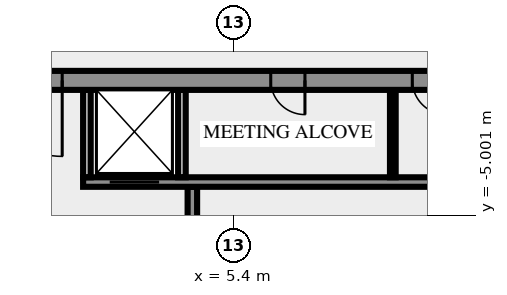
"""IFC4 building model, lengths in metres.
Left out: names, types, materials, properties, quantities, classifications, styles, units other than length and angle.
Written with IfcOpenShell. Run it as: python <this file> out.ifc"""

import sys

from ifc_helpers import new_model, si_unit, direction, frame, frame_2d, origin, place, context, subcontext, project, spatial, rectangle, extrude, element, fill, save


model = new_model("IFC4")
c1 = context("Model", 3, precision=1e-05, world=origin(), true_north=direction((0.0, 1.0)))
c2 = subcontext(c1, "Body", "Model", "MODEL_VIEW")
j1 = project(units=[si_unit("LENGTHUNIT", "METRE"), si_unit("PLANEANGLEUNIT", "RADIAN")], contexts=[c1])
p1 = place(None, origin())
s1 = spatial("IfcSite", under=j1, at=p1, CompositionType="ELEMENT")
p2 = place(p1, origin())
s2 = spatial("IfcBuilding", under=s1, at=p2, CompositionType="ELEMENT")
p3 = place(p2, frame((0.0, 0.0, 281.0)))
s3 = spatial("IfcBuildingStorey", under=s2, at=p3, CompositionType="ELEMENT", Elevation=281.0)
p4 = place(p3, frame((4.325, -7.25, 0.0), z_axis=(0.0, 0.0, 1.0), x_axis=(0.0, 1.0, 0.0)))
e1 = element("IfcWall", 1, at=p4, inside=s3, PredefinedType="SHEAR", context=c2, shape_type="SweptSolid", body=[
    extrude(rectangle(XDim=3.0, YDim=0.25, at=frame_2d((1.5, 0.0))), origin(), (0.0, 0.0, 1.0), 3.65),
])
p5 = place(p4, frame((0.8, 0.0, 0.0)))
e2 = element("IfcOpeningElement", 2, at=p5, cuts=e1, PredefinedType="OPENING", context=c2, shape_type="SweptSolid", body=[
    extrude(rectangle(XDim=1.4, YDim=2.1, at=frame_2d((0.7, 1.05))), frame((0.0, 0.135, 0.0), z_axis=(0.0, -1.0, 0.0), x_axis=(1.0, 0.0, 0.0)), (0.0, 0.0, 1.0), 0.27),
])
p6 = place(p3, frame((1.45, -4.125, 0.0), z_axis=(0.0, 0.0, 1.0), x_axis=(1.0, 0.0, 0.0)))
e3 = element("IfcWall", 3, at=p6, inside=s3, PredefinedType="SHEAR", context=c2, shape_type="SweptSolid", body=[
    extrude(rectangle(XDim=12.9, YDim=0.25, at=frame_2d((6.45, 0.0))), origin(), (0.0, 0.0, 1.0), 3.65),
])
p7 = place(p6, frame((0.7, 0.0, 0.0)))
e4 = element("IfcOpeningElement", 4, at=p7, cuts=e3, PredefinedType="OPENING", context=c2, shape_type="SweptSolid", body=[
    extrude(rectangle(XDim=1.3, YDim=2.1, at=frame_2d((0.65, 1.05))), frame((0.0, 0.135, 0.0), z_axis=(0.0, -1.0, 0.0), x_axis=(1.0, 0.0, 0.0)), (0.0, 0.0, 1.0), 0.27),
])
for number, where, z_axis, x_axis in (
    (5, (1.55, -4.0, 0.0), (0.0, 0.0, 1.0), (0.0, 1.0, 0.0)),
    (6, (4.05, -4.0, 0.0), (0.0, 0.0, 1.0), (0.0, 1.0, 0.0)),
):
    element("IfcWall", number, at=place(p3, frame(where, z_axis=z_axis, x_axis=x_axis)), inside=s3, PredefinedType="SOLIDWALL", context=c2, shape_type="SweptSolid", body=[
        extrude(rectangle(XDim=2.3, YDim=0.2, at=frame_2d((1.15, 0.0))), origin(), (0.0, 0.0, 1.0), 3.65),
    ])
p8 = place(p3, frame((9.6, -4.0, 0.0), z_axis=(0.0, 0.0, 1.0), x_axis=(0.0, 1.0, 0.0)))
e7 = element("IfcWall", 7, at=p8, inside=s3, PredefinedType="PARTITIONING", context=c2, shape_type="SweptSolid", body=[
    extrude(rectangle(XDim=2.3, YDim=0.15, at=frame_2d((1.15, 0.0))), origin(), (0.0, 0.0, 1.0), 3.65),
])
p9 = place(p3, frame((20.49, -1.45, 0.0), z_axis=(0.0, 0.0, 1.0), x_axis=(-1.0, 0.0, 0.0)))
e8 = element("IfcWall", 8, at=p9, inside=s3, PredefinedType="SHEAR", context=c2, shape_type="SweptSolid", body=[
    extrude(rectangle(XDim=40.98, YDim=0.5, at=frame_2d((20.49, 0.0))), origin(), (0.0, 0.0, 1.0), 3.65),
])
p10 = place(p9, frame((38.14, 0.0, 0.0)))
e9 = element("IfcOpeningElement", 9, at=p10, cuts=e8, PredefinedType="OPENING", context=c2, shape_type="SweptSolid", body=[
    extrude(rectangle(XDim=1.8, YDim=2.1, at=frame_2d((0.9, 1.05))), frame((0.0, 0.26, 0.0), z_axis=(0.0, -1.0, 0.0), x_axis=(1.0, 0.0, 0.0)), (0.0, 0.0, 1.0), 0.52),
])
p11 = place(p9, frame((36.728, 0.0, 0.0)))
e10 = element("IfcOpeningElement", 10, at=p11, cuts=e8, PredefinedType="OPENING", context=c2, shape_type="SweptSolid", body=[
    extrude(rectangle(XDim=0.8, YDim=2.1, at=frame_2d((0.4, 1.05))), frame((0.0, 0.26, 0.0), z_axis=(0.0, -1.0, 0.0), x_axis=(1.0, 0.0, 0.0)), (0.0, 0.0, 1.0), 0.52),
])
p12 = place(p9, frame((35.153, 0.0, 0.0)))
e11 = element("IfcOpeningElement", 11, at=p12, cuts=e8, PredefinedType="OPENING", context=c2, shape_type="SweptSolid", body=[
    extrude(rectangle(XDim=0.8, YDim=2.1, at=frame_2d((0.4, 1.05))), frame((0.0, 0.26, 0.0), z_axis=(0.0, -1.0, 0.0), x_axis=(1.0, 0.0, 0.0)), (0.0, 0.0, 1.0), 0.52),
])
p13 = place(p9, frame((32.94, 0.0, 0.0)))
e12 = element("IfcOpeningElement", 12, at=p13, cuts=e8, PredefinedType="OPENING", context=c2, shape_type="SweptSolid", body=[
    extrude(rectangle(XDim=0.9, YDim=2.1, at=frame_2d((0.45, 1.05))), frame((0.0, 0.26, 0.0), z_axis=(0.0, -1.0, 0.0), x_axis=(1.0, 0.0, 0.0)), (0.0, 0.0, 1.0), 0.52),
])
p14 = place(p9, frame((31.015, 0.0, 0.0)))
e13 = element("IfcOpeningElement", 13, at=p14, cuts=e8, PredefinedType="OPENING", context=c2, shape_type="SweptSolid", body=[
    extrude(rectangle(XDim=0.8, YDim=2.1, at=frame_2d((0.4, 1.05))), frame((0.0, 0.26, 0.0), z_axis=(0.0, -1.0, 0.0), x_axis=(1.0, 0.0, 0.0)), (0.0, 0.0, 1.0), 0.52),
])
p15 = place(p9, frame((24.765, 0.0, 0.0)))
e14 = element("IfcOpeningElement", 14, at=p15, cuts=e8, PredefinedType="OPENING", context=c2, shape_type="SweptSolid", body=[
    extrude(rectangle(XDim=0.8, YDim=2.1, at=frame_2d((0.4, 1.05))), frame((0.0, 0.26, 0.0), z_axis=(0.0, -1.0, 0.0), x_axis=(1.0, 0.0, 0.0)), (0.0, 0.0, 1.0), 0.52),
])
p16 = place(p9, frame((19.59, 0.0, 0.0)))
e15 = element("IfcOpeningElement", 15, at=p16, cuts=e8, PredefinedType="OPENING", context=c2, shape_type="SweptSolid", body=[
    extrude(rectangle(XDim=2.0, YDim=2.1, at=frame_2d((1.0, 1.05))), frame((0.0, 0.26, 0.0), z_axis=(0.0, -1.0, 0.0), x_axis=(1.0, 0.0, 0.0)), (0.0, 0.0, 1.0), 0.52),
])
p17 = place(p9, frame((13.202, 0.0, 0.0)))
e16 = element("IfcOpeningElement", 16, at=p17, cuts=e8, PredefinedType="OPENING", context=c2, shape_type="SweptSolid", body=[
    extrude(rectangle(XDim=0.9, YDim=2.1, at=frame_2d((0.45, 1.05))), frame((0.0, 0.26, 0.0), z_axis=(0.0, -1.0, 0.0), x_axis=(1.0, 0.0, 0.0)), (0.0, 0.0, 1.0), 0.52),
])
p18 = place(p9, frame((9.478, 0.0, 0.0)))
e17 = element("IfcOpeningElement", 17, at=p18, cuts=e8, PredefinedType="OPENING", context=c2, shape_type="SweptSolid", body=[
    extrude(rectangle(XDim=0.9, YDim=2.1, at=frame_2d((0.45, 1.05))), frame((0.0, 0.26, 0.0), z_axis=(0.0, -1.0, 0.0), x_axis=(1.0, 0.0, 0.0)), (0.0, 0.0, 1.0), 0.52),
])
p19 = place(p9, frame((7.14, 0.0, 0.0)))
e18 = element("IfcOpeningElement", 18, at=p19, cuts=e8, PredefinedType="OPENING", context=c2, shape_type="SweptSolid", body=[
    extrude(rectangle(XDim=0.9, YDim=2.1, at=frame_2d((0.45, 1.05))), frame((0.0, 0.26, 0.0), z_axis=(0.0, -1.0, 0.0), x_axis=(1.0, 0.0, 0.0)), (0.0, 0.0, 1.0), 0.52),
])
p20 = place(p9, frame((4.19, 0.0, 0.0)))
e19 = element("IfcOpeningElement", 19, at=p20, cuts=e8, PredefinedType="OPENING", context=c2, shape_type="SweptSolid", body=[
    extrude(rectangle(XDim=0.9, YDim=2.1, at=frame_2d((0.45, 1.05))), frame((0.0, 0.26, 0.0), z_axis=(0.0, -1.0, 0.0), x_axis=(1.0, 0.0, 0.0)), (0.0, 0.0, 1.0), 0.52),
])
p21 = place(p9, frame((1.04, 0.0, 0.0)))
e20 = element("IfcOpeningElement", 20, at=p21, cuts=e8, PredefinedType="OPENING", context=c2, shape_type="SweptSolid", body=[
    extrude(rectangle(XDim=1.8, YDim=2.1, at=frame_2d((0.9, 1.05))), frame((0.0, 0.26, 0.0), z_axis=(0.0, -1.0, 0.0), x_axis=(1.0, 0.0, 0.0)), (0.0, 0.0, 1.0), 0.52),
])
p22 = place(p7, origin())
e21 = element("IfcDoor", 21, at=p22, inside=s3, OperationType="DOUBLE_DOOR_SLIDING", PredefinedType="DOOR", context=c2, shape_type="SweptSolid", body=[
    extrude(rectangle(XDim=1.3, YDim=2.1, at=frame_2d((0.65, 1.05))), frame((0.0, 0.025, 0.0), z_axis=(0.0, -1.0, 0.0), x_axis=(1.0, 0.0, 0.0)), (0.0, 0.0, 1.0), 0.05),
])
fill(e4, e21)
p23 = place(p16, origin())
e22 = element("IfcDoor", 22, at=p23, inside=s3, OperationType="DOUBLE_DOOR_SINGLE_SWING", PredefinedType="DOOR", context=c2, shape_type="SweptSolid", body=[
    extrude(rectangle(XDim=2.0, YDim=2.1, at=frame_2d((1.0, 1.05))), frame((0.0, 0.025, 0.0), z_axis=(0.0, -1.0, 0.0), x_axis=(1.0, 0.0, 0.0)), (0.0, 0.0, 1.0), 0.05),
])
fill(e15, e22)
p24 = place(p17, origin())
e23 = element("IfcDoor", 23, at=p24, inside=s3, OperationType="SINGLE_SWING_LEFT", PredefinedType="DOOR", context=c2, shape_type="SweptSolid", body=[
    extrude(rectangle(XDim=0.9, YDim=2.1, at=frame_2d((0.45, 1.05))), frame((0.0, 0.025, 0.0), z_axis=(0.0, -1.0, 0.0), x_axis=(1.0, 0.0, 0.0)), (0.0, 0.0, 1.0), 0.05),
])
fill(e16, e23)
p25 = place(p18, origin())
e24 = element("IfcDoor", 24, at=p25, inside=s3, OperationType="SINGLE_SWING_LEFT", PredefinedType="DOOR", context=c2, shape_type="SweptSolid", body=[
    extrude(rectangle(XDim=0.9, YDim=2.1, at=frame_2d((0.45, 1.05))), frame((0.0, 0.025, 0.0), z_axis=(0.0, -1.0, 0.0), x_axis=(1.0, 0.0, 0.0)), (0.0, 0.0, 1.0), 0.05),
])
fill(e17, e24)
save(model, sys.argv[1])
